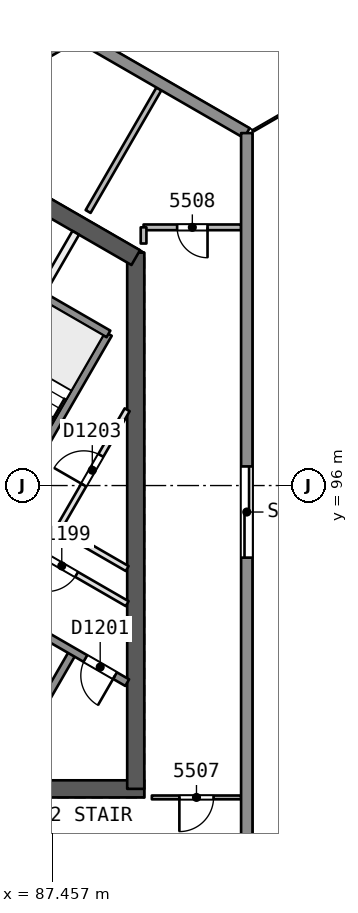
"""IFC4 building model, lengths in metres.
Left out: names, types, materials, properties, quantities, classifications, styles, units other than length and angle.
Written with IfcOpenShell. Run it as: python <this file> out.ifc"""

import sys

from ifc_helpers import new_model, si_unit, direction, frame, frame_2d, origin, origin_2d, place, context, subcontext, project, spatial, rectangle, extrude, element, fill, save


model = new_model("IFC4")
c1 = context("Model", 3, precision=1e-05, world=origin(), true_north=direction((0.0, 1.0)))
c2 = subcontext(c1, "Body", "Model", "MODEL_VIEW")
j1 = project(units=[si_unit("LENGTHUNIT", "METRE"), si_unit("PLANEANGLEUNIT", "RADIAN")], contexts=[c1])
p1 = place(None, origin())
s1 = spatial("IfcSite", under=j1, at=p1, CompositionType="ELEMENT")
p2 = place(p1, origin())
s2 = spatial("IfcBuilding", under=s1, at=p2, CompositionType="ELEMENT")
p3 = place(p2, frame((0.0, 0.0, 224.3)))
s3 = spatial("IfcBuildingStorey", under=s2, at=p3, CompositionType="ELEMENT", Elevation=224.3)
p4 = place(p3, frame((79.63, 88.019, 0.0), z_axis=(0.0, 0.0, 1.0), x_axis=(1.0, 0.0, 0.0)))
e1 = element("IfcWall", 1, at=p4, inside=s3, PredefinedType="SHEAR", context=c2, shape_type="SweptSolid", body=[
    extrude(rectangle(XDim=10.25, YDim=0.45, at=frame_2d((5.125, 0.0))), origin(), (0.0, 0.0, 1.0), 3.7),
])
p5 = place(p4, frame((0.82, 0.0, 0.0)))
e2 = element("IfcOpeningElement", 2, at=p5, cuts=e1, PredefinedType="OPENING", context=c2, shape_type="SweptSolid", body=[
    extrude(rectangle(XDim=1.2, YDim=2.1, at=frame_2d((0.6, 1.05))), frame((0.0, 0.235, 0.0), z_axis=(0.0, -1.0, 0.0), x_axis=(1.0, 0.0, 0.0)), (0.0, 0.0, 1.0), 0.471),
])
p6 = place(p3, frame((89.655, 88.019, 0.0), z_axis=(0.0, 0.0, 1.0), x_axis=(0.0, 1.0, 0.0)))
e3 = element("IfcWall", 3, at=p6, inside=s3, PredefinedType="SHEAR", context=c2, shape_type="SweptSolid", body=[
    extrude(rectangle(XDim=14.108, YDim=0.45, at=frame_2d((7.054, 0.0))), origin(), (0.0, 0.0, 1.0), 3.7),
])
p7 = place(p3, frame((89.655, 101.998, 0.0), z_axis=(0.0, 0.0, 1.0), x_axis=(-0.866042179588, 0.49997094233, 0.0)))
e4 = element("IfcWall", 4, at=p7, inside=s3, PredefinedType="SHEAR", context=c2, shape_type="SweptSolid", body=[
    extrude(rectangle(XDim=3.515, YDim=0.45, at=frame_2d((1.758, 0.0))), origin(), (0.0, 0.0, 1.0), 3.7),
])
p8 = place(p3, frame((91.613, 108.775, 0.0), z_axis=(-0.017541078386, -0.030532027415, 0.999379860649), x_axis=(0.867090277759, -0.498151031531, 1.37663e-07)))
e5 = element("IfcColumn", 5, at=p8, inside=s3, PredefinedType="COLUMN", context=c2, shape_type="SweptSolid", body=[
    extrude(rectangle(XDim=1.9, YDim=1.9, at=origin_2d()), origin(), (0.0, 0.0, 1.0), 3.702),
])
p9 = place(p3, frame((92.428, 87.794, 0.0), z_axis=(0.0, 0.0, 1.0), x_axis=(-1.0, 0.0, 0.0)))
e6 = element("IfcWall", 6, at=p9, inside=s3, PredefinedType="PARTITIONING", context=c2, shape_type="SweptSolid", body=[
    extrude(rectangle(XDim=2.349, YDim=0.1, at=frame_2d((1.175, 0.0))), origin(), (0.0, 0.0, 1.0), 3.3),
])
p10 = place(p9, frame((0.725, 0.0, 0.0)))
e7 = element("IfcOpeningElement", 7, at=p10, cuts=e6, PredefinedType="OPENING", context=c2, shape_type="SweptSolid", body=[
    extrude(rectangle(XDim=0.9, YDim=2.1, at=frame_2d((0.45, 1.05))), frame((0.0, 0.061, 0.0), z_axis=(0.0, -1.0, 0.0), x_axis=(1.0, 0.0, 0.0)), (0.0, 0.0, 1.0), 0.121),
])
p11 = place(p3, frame((92.428, 102.794, 0.0), z_axis=(0.0, 0.0, 1.0), x_axis=(-1.0, 0.0, 0.0)))
e8 = element("IfcWall", 8, at=p11, inside=s3, PredefinedType="PARTITIONING", context=c2, shape_type="SweptSolid", body=[
    extrude(rectangle(XDim=2.567, YDim=0.15, at=frame_2d((1.284, 0.0))), origin(), (0.0, 0.0, 1.0), 3.3),
])
p12 = place(p11, frame((0.884, 0.0, 0.0)))
e9 = element("IfcOpeningElement", 9, at=p12, cuts=e8, PredefinedType="OPENING", context=c2, shape_type="SweptSolid", body=[
    extrude(rectangle(XDim=0.8, YDim=2.1, at=frame_2d((0.4, 1.05))), frame((0.0, 0.085, 0.0), z_axis=(0.0, -1.0, 0.0), x_axis=(1.0, 0.0, 0.0)), (0.0, 0.0, 1.0), 0.171),
])
p13 = place(p3, frame((89.861, 102.794, 0.0), z_axis=(0.0, 0.0, 1.0), x_axis=(0.0, -1.0, 0.0)))
e10 = element("IfcWall", 10, at=p13, inside=s3, PredefinedType="PARTITIONING", context=c2, shape_type="SweptSolid", body=[
    extrude(rectangle(XDim=0.426, YDim=0.15, at=frame_2d((0.213, 0.0))), origin(), (0.0, 0.0, 1.0), 3.3),
])
p14 = place(p3, frame((90.264, 106.437, 0.0), z_axis=(0.0, 0.0, 1.0), x_axis=(-0.499966389646, -0.866044807862, 0.0)))
e11 = element("IfcWall", 11, at=p14, inside=s3, PredefinedType="PARTITIONING", context=c2, shape_type="SweptSolid", body=[
    extrude(rectangle(XDim=3.725, YDim=0.15, at=frame_2d((1.863, 0.0))), origin(), (0.0, 0.0, 1.0), 3.3),
])
p15 = place(p3, frame((88.099, 107.859, 0.0), z_axis=(0.0, 0.0, 1.0), x_axis=(0.866032272612, -0.499988102653, 0.0)))
e12 = element("IfcWall", 12, at=p15, inside=s3, PredefinedType="SOLIDWALL", context=c2, shape_type="SweptSolid", body=[
    extrude(rectangle(XDim=5.171, YDim=0.3, at=frame_2d((2.585, 0.0))), origin(), (0.0, 0.0, 1.0), 3.3),
])
p16 = place(p3, frame((92.577, 105.274, 0.0), z_axis=(0.0, 0.0, 1.0), x_axis=(0.0, -1.0, 0.0)))
e13 = element("IfcWall", 13, at=p16, inside=s3, PredefinedType="SOLIDWALL", context=c2, shape_type="SweptSolid", body=[
    extrude(rectangle(XDim=50.547, YDim=0.3, at=frame_2d((25.274, 0.0))), origin(), (0.0, 0.0, 1.0), 3.3),
])
p17 = place(p16, frame((29.218, 0.0, 0.0)))
e14 = element("IfcOpeningElement", 14, at=p17, cuts=e13, PredefinedType="OPENING", context=c2, shape_type="SweptSolid", body=[
    extrude(rectangle(XDim=2.4, YDim=2.4, at=frame_2d((1.2, 1.2))), frame((0.0, 0.161, 0.0), z_axis=(0.0, -1.0, 0.0), x_axis=(1.0, 0.0, 0.0)), (0.0, 0.0, 1.0), 0.321),
])
p18 = place(p16, frame((39.328, 0.0, 0.0)))
e15 = element("IfcOpeningElement", 15, at=p18, cuts=e13, PredefinedType="OPENING", context=c2, shape_type="SweptSolid", body=[
    extrude(rectangle(XDim=2.4, YDim=2.4, at=frame_2d((1.2, 1.2))), frame((0.0, 0.161, 0.0), z_axis=(0.0, -1.0, 0.0), x_axis=(1.0, 0.0, 0.0)), (0.0, 0.0, 1.0), 0.321),
])
p19 = place(p16, frame((18.774, 0.0, 0.0)))
e16 = element("IfcOpeningElement", 16, at=p19, cuts=e13, PredefinedType="OPENING", context=c2, shape_type="SweptSolid", body=[
    extrude(rectangle(XDim=2.4, YDim=2.4, at=frame_2d((1.2, 1.2))), frame((0.0, 0.161, 0.0), z_axis=(0.0, -1.0, 0.0), x_axis=(1.0, 0.0, 0.0)), (0.0, 0.0, 1.0), 0.321),
])
p20 = place(p16, frame((8.771, 0.0, 0.0)))
e17 = element("IfcOpeningElement", 17, at=p20, cuts=e13, PredefinedType="OPENING", context=c2, shape_type="SweptSolid", body=[
    extrude(rectangle(XDim=2.4, YDim=2.4, at=frame_2d((1.2, 1.2))), frame((0.0, 0.161, 0.0), z_axis=(0.0, -1.0, 0.0), x_axis=(1.0, 0.0, 0.0)), (0.0, 0.0, 1.0), 0.321),
])
p21 = place(p16, frame((23.918, 0.0, 0.0)))
e18 = element("IfcOpeningElement", 18, at=p21, cuts=e13, PredefinedType="OPENING", context=c2, shape_type="SweptSolid", body=[
    extrude(rectangle(XDim=2.4, YDim=2.4, at=frame_2d((1.2, 1.2))), frame((0.0, 0.161, 0.0), z_axis=(0.0, -1.0, 0.0), x_axis=(1.0, 0.0, 0.0)), (0.0, 0.0, 1.0), 0.321),
])
p22 = place(p3, frame((44.324, 82.585, 0.0), z_axis=(0.0, 0.0, 1.0), x_axis=(0.86602584856, 0.499999229625, 0.0)))
e19 = element("IfcWall", 19, at=p22, inside=s3, PredefinedType="SOLIDWALL", context=c2, shape_type="SweptSolid", body=[
    extrude(rectangle(XDim=50.547, YDim=0.3, at=frame_2d((25.274, 0.0))), origin(), (0.0, 0.0, 1.0), 3.3),
])
p23 = place(p22, frame((24.23, 0.0, 0.0)))
e20 = element("IfcOpeningElement", 20, at=p23, cuts=e19, PredefinedType="OPENING", context=c2, shape_type="SweptSolid", body=[
    extrude(rectangle(XDim=2.4, YDim=2.4, at=frame_2d((1.2, 1.2))), frame((0.0, 0.161, 0.0), z_axis=(0.0, -1.0, 0.0), x_axis=(1.0, 0.0, 0.0)), (0.0, 0.0, 1.0), 0.321),
])
p24 = place(p22, frame((29.218, 0.0, 0.0)))
e21 = element("IfcOpeningElement", 21, at=p24, cuts=e19, PredefinedType="OPENING", context=c2, shape_type="SweptSolid", body=[
    extrude(rectangle(XDim=2.4, YDim=2.4, at=frame_2d((1.2, 1.2))), frame((0.0, 0.161, 0.0), z_axis=(0.0, -1.0, 0.0), x_axis=(1.0, 0.0, 0.0)), (0.0, 0.0, 1.0), 0.321),
])
p25 = place(p22, frame((39.328, 0.0, 0.0)))
e22 = element("IfcOpeningElement", 22, at=p25, cuts=e19, PredefinedType="OPENING", context=c2, shape_type="SweptSolid", body=[
    extrude(rectangle(XDim=2.4, YDim=2.4, at=frame_2d((1.2, 1.2))), frame((0.0, 0.161, 0.0), z_axis=(0.0, -1.0, 0.0), x_axis=(1.0, 0.0, 0.0)), (0.0, 0.0, 1.0), 0.321),
])
p26 = place(p22, frame((19.085, 0.0, 0.0)))
e23 = element("IfcOpeningElement", 23, at=p26, cuts=e19, PredefinedType="OPENING", context=c2, shape_type="SweptSolid", body=[
    extrude(rectangle(XDim=2.4, YDim=2.4, at=frame_2d((1.2, 1.2))), frame((0.0, 0.161, 0.0), z_axis=(0.0, -1.0, 0.0), x_axis=(1.0, 0.0, 0.0)), (0.0, 0.0, 1.0), 0.321),
])
p27 = place(p22, frame((8.771, 0.0, 0.0)))
e24 = element("IfcOpeningElement", 24, at=p27, cuts=e19, PredefinedType="OPENING", context=c2, shape_type="SweptSolid", body=[
    extrude(rectangle(XDim=2.4, YDim=2.4, at=frame_2d((1.2, 1.2))), frame((0.0, 0.161, 0.0), z_axis=(0.0, -1.0, 0.0), x_axis=(1.0, 0.0, 0.0)), (0.0, 0.0, 1.0), 0.321),
])
p28 = place(p3, frame((86.77, 89.486, 0.0), z_axis=(0.0, 0.0, 1.0), x_axis=(0.499961042966, 0.86604789447, 0.0)))
e25 = element("IfcWall", 25, at=p28, inside=s3, PredefinedType="SOLIDWALL", context=c2, shape_type="SweptSolid", body=[
    extrude(rectangle(XDim=2.48, YDim=0.2, at=frame_2d((1.24, 0.0))), origin(), (0.0, 0.0, 1.0), 3.3),
])
p29 = place(p3, frame((87.621, 94.86, 0.0), z_axis=(0.0, 0.0, 1.0), x_axis=(0.499993116331, 0.866029378036, 0.0)))
e26 = element("IfcWall", 26, at=p29, inside=s3, PredefinedType="PARTITIONING", context=c2, shape_type="SweptSolid", body=[
    extrude(rectangle(XDim=3.618, YDim=0.15, at=frame_2d((1.809, 0.0))), origin(), (0.0, 0.0, 1.0), 3.3),
])
p30 = place(p29, frame((1.332, 0.0, 0.0)))
e27 = element("IfcOpeningElement", 27, at=p30, cuts=e26, PredefinedType="OPENING", context=c2, shape_type="SweptSolid", body=[
    extrude(rectangle(XDim=0.9, YDim=2.1, at=frame_2d((0.45, 1.05))), frame((0.0, 0.085, 0.0), z_axis=(0.0, -1.0, 0.0), x_axis=(1.0, 0.0, 0.0)), (0.0, 0.0, 1.0), 0.171),
])
p31 = place(p3, frame((85.087, 93.321, 0.0), z_axis=(0.0, 0.0, 1.0), x_axis=(0.500019787375, 0.866013979237, 0.0)))
e28 = element("IfcWall", 28, at=p31, inside=s3, PredefinedType="SOLIDWALL", context=c2, shape_type="SweptSolid", body=[
    extrude(rectangle(XDim=7.7, YDim=0.2, at=frame_2d((3.85, 0.0))), origin(), (0.0, 0.0, 1.0), 3.3),
])
p32 = place(p3, frame((87.09, 100.94, 0.0), z_axis=(0.0, 0.0, 1.0), x_axis=(0.500011643316, 0.866018681408, 0.0)))
e29 = element("IfcWall", 29, at=p32, inside=s3, PredefinedType="PARTITIONING", context=c2, shape_type="SweptSolid", body=[
    extrude(rectangle(XDim=1.973, YDim=0.2, at=frame_2d((0.987, 0.0))), origin(), (0.0, 0.0, 1.0), 3.3),
])
p33 = place(p3, frame((89.43, 90.814, 0.0), z_axis=(0.0, 0.0, 1.0), x_axis=(-0.866018983788, 0.500011119594, 0.0)))
e30 = element("IfcWall", 30, at=p33, inside=s3, PredefinedType="SOLIDWALL", context=c2, shape_type="SweptSolid", body=[
    extrude(rectangle(XDim=10.64, YDim=0.2, at=frame_2d((5.32, 0.0))), origin(), (0.0, 0.0, 1.0), 3.3),
])
p34 = place(p33, frame((0.37, 0.0, 0.0)))
e31 = element("IfcOpeningElement", 31, at=p34, cuts=e30, PredefinedType="OPENING", context=c2, shape_type="SweptSolid", body=[
    extrude(rectangle(XDim=0.9, YDim=2.1, at=frame_2d((0.45, 1.05))), frame((0.0, 0.11, 0.0), z_axis=(0.0, -1.0, 0.0), x_axis=(1.0, 0.0, 0.0)), (0.0, 0.0, 1.0), 0.221),
])
p35 = place(p3, frame((89.43, 92.892, 0.0), z_axis=(0.0, 0.0, 1.0), x_axis=(-0.866019912421, 0.500009511199, 0.0)))
e32 = element("IfcWall", 32, at=p35, inside=s3, PredefinedType="PARTITIONING", context=c2, shape_type="SweptSolid", body=[
    extrude(rectangle(XDim=3.976, YDim=0.15, at=frame_2d((1.988, 0.0))), origin(), (0.0, 0.0, 1.0), 3.3),
])
p36 = place(p35, frame((1.538, 0.0, 0.0)))
e33 = element("IfcOpeningElement", 33, at=p36, cuts=e32, PredefinedType="OPENING", context=c2, shape_type="SweptSolid", body=[
    extrude(rectangle(XDim=0.9, YDim=2.1, at=frame_2d((0.45, 1.05))), frame((0.0, 0.085, 0.0), z_axis=(0.0, -1.0, 0.0), x_axis=(1.0, 0.0, 0.0)), (0.0, 0.0, 1.0), 0.171),
])
p37 = place(p3, frame((89.43, 93.816, 0.0), z_axis=(0.0, 0.0, 1.0), x_axis=(-0.866004557827, 0.500036104519, 0.0)))
e34 = element("IfcWall", 34, at=p37, inside=s3, PredefinedType="PARTITIONING", context=c2, shape_type="SweptSolid", body=[
    extrude(rectangle(XDim=2.089, YDim=0.15, at=frame_2d((1.044, 0.0))), origin(), (0.0, 0.0, 1.0), 3.3),
])
p38 = place(p3, frame((88.937, 99.99, 0.0), z_axis=(0.0, 0.0, 1.0), x_axis=(-0.866004344652, 0.500036473714, 0.0)))
e35 = element("IfcWall", 35, at=p38, inside=s3, PredefinedType="SOLIDWALL", context=c2, shape_type="SweptSolid", body=[
    extrude(rectangle(XDim=4.15, YDim=0.2, at=frame_2d((2.075, 0.0))), origin(), (0.0, 0.0, 1.0), 3.3),
])
p39 = place(p10, origin())
e36 = element("IfcDoor", 36, at=p39, inside=s3, OperationType="SINGLE_SWING_RIGHT", PredefinedType="NOTDEFINED", context=c2, shape_type="SweptSolid", body=[
    extrude(rectangle(XDim=0.9, YDim=2.1, at=frame_2d((0.45, 1.05))), frame((0.0, 0.025, 0.0), z_axis=(0.0, -1.0, 0.0), x_axis=(1.0, 0.0, 0.0)), (0.0, 0.0, 1.0), 0.05),
])
fill(e7, e36)
p40 = place(p12, origin())
e37 = element("IfcDoor", 37, at=p40, inside=s3, OperationType="SINGLE_SWING_LEFT", PredefinedType="NOTDEFINED", context=c2, shape_type="SweptSolid", body=[
    extrude(rectangle(XDim=0.8, YDim=2.1, at=frame_2d((0.4, 1.05))), frame((0.0, 0.025, 0.0), z_axis=(0.0, -1.0, 0.0), x_axis=(1.0, 0.0, 0.0)), (0.0, 0.0, 1.0), 0.05),
])
fill(e9, e37)
p41 = place(p20, origin())
e38 = element("IfcDoor", 38, at=p41, inside=s3, OperationType="SLIDING_TO_RIGHT", PredefinedType="NOTDEFINED", context=c2, shape_type="SweptSolid", body=[
    extrude(rectangle(XDim=2.4, YDim=2.4, at=frame_2d((1.2, 1.2))), frame((0.0, 0.025, 0.0), z_axis=(0.0, -1.0, 0.0), x_axis=(1.0, 0.0, 0.0)), (0.0, 0.0, 1.0), 0.05),
])
fill(e17, e38)
p42 = place(p36, origin())
e39 = element("IfcDoor", 39, at=p42, inside=s3, OperationType="SINGLE_SWING_RIGHT", PredefinedType="NOTDEFINED", context=c2, shape_type="SweptSolid", body=[
    extrude(rectangle(XDim=0.9, YDim=2.1, at=frame_2d((0.45, 1.05))), frame((0.0, 0.025, 0.0), z_axis=(0.0, -1.0, 0.0), x_axis=(1.0, 0.0, 0.0)), (0.0, 0.0, 1.0), 0.05),
])
fill(e33, e39)
p43 = place(p34, origin())
e40 = element("IfcDoor", 40, at=p43, inside=s3, OperationType="SINGLE_SWING_LEFT", PredefinedType="NOTDEFINED", context=c2, shape_type="SweptSolid", body=[
    extrude(rectangle(XDim=0.9, YDim=2.1, at=frame_2d((0.45, 1.05))), frame((0.0, 0.025, 0.0), z_axis=(0.0, -1.0, 0.0), x_axis=(1.0, 0.0, 0.0)), (0.0, 0.0, 1.0), 0.05),
])
fill(e31, e40)
p44 = place(p30, origin())
e41 = element("IfcDoor", 41, at=p44, inside=s3, OperationType="SINGLE_SWING_LEFT", PredefinedType="NOTDEFINED", context=c2, shape_type="SweptSolid", body=[
    extrude(rectangle(XDim=0.9, YDim=2.1, at=frame_2d((0.45, 1.05))), frame((0.0, 0.025, 0.0), z_axis=(0.0, -1.0, 0.0), x_axis=(1.0, 0.0, 0.0)), (0.0, 0.0, 1.0), 0.05),
])
fill(e27, e41)
save(model, sys.argv[1])
